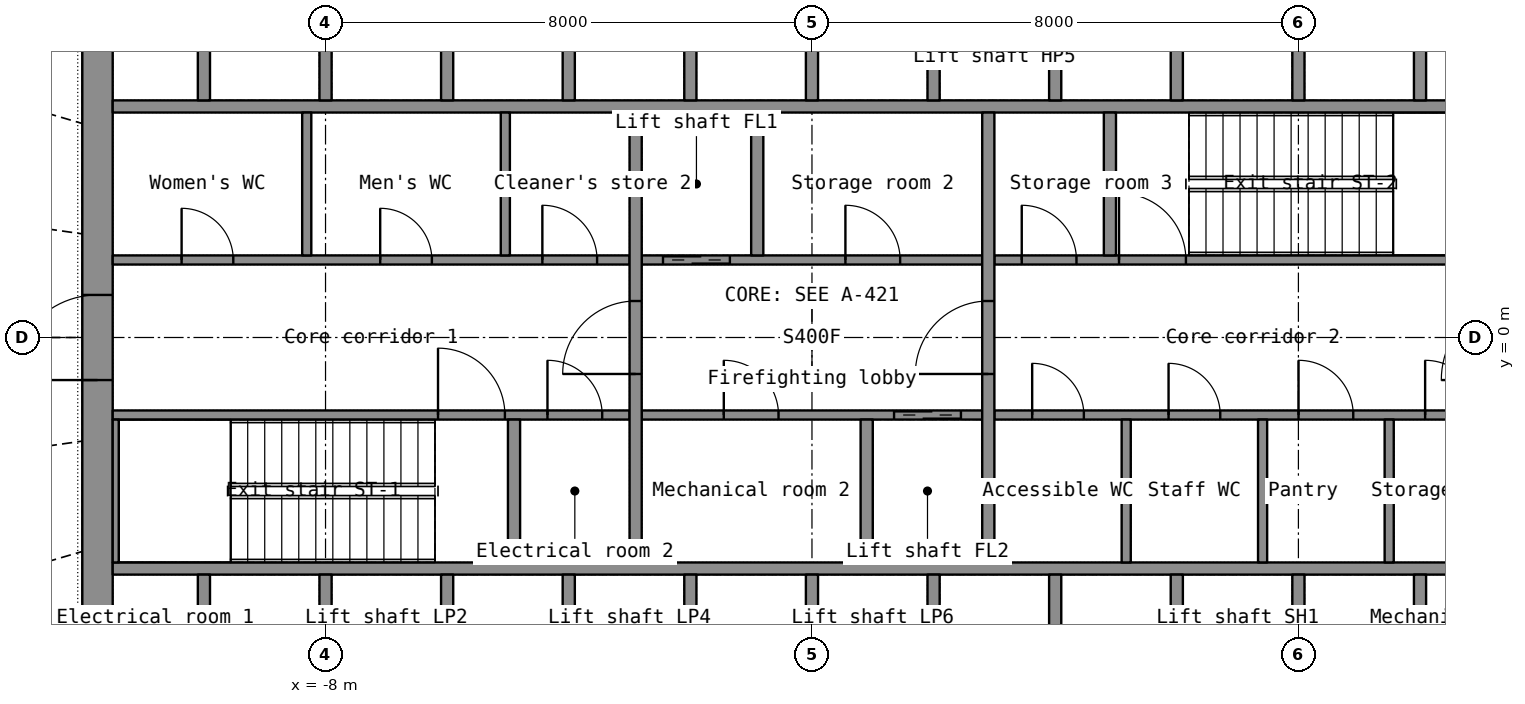
"""IFC4 building model, lengths in metres.
Left out: names, types, materials, properties, quantities, classifications, styles, units other than length and angle.
Written with IfcOpenShell. Run it as: python <this file> out.ifc"""

import sys

from ifc_helpers import new_model, si_unit, direction, frame, frame_2d, origin, place, context, subcontext, project, spatial, rectangle, extrude, element, fill, save


model = new_model("IFC4")
c1 = context("Model", 3, precision=1e-05, world=origin(), true_north=direction((0.0, 1.0)))
c2 = subcontext(c1, "Body", "Model", "MODEL_VIEW")
j1 = project(units=[si_unit("LENGTHUNIT", "METRE"), si_unit("PLANEANGLEUNIT", "RADIAN")], contexts=[c1])
p1 = place(None, origin())
s1 = spatial("IfcSite", under=j1, at=p1, CompositionType="ELEMENT")
p2 = place(p1, origin())
s2 = spatial("IfcBuilding", under=s1, at=p2, CompositionType="ELEMENT")
p3 = place(p2, frame((0.0, 0.0, 152.6)))
s3 = spatial("IfcBuildingStorey", under=s2, at=p3, CompositionType="ELEMENT", Elevation=152.6)
p4 = place(p3, frame((-11.75, -7.2, 0.0), z_axis=(0.0, 0.0, 1.0), x_axis=(0.0, 1.0, 0.0)))
e1 = element("IfcWall", 1, at=p4, inside=s3, PredefinedType="SHEAR", context=c2, shape_type="SweptSolid", body=[
    extrude(rectangle(XDim=14.4, YDim=0.5, at=frame_2d((7.2, 0.0))), origin(), (0.0, 0.0, 1.0), 4.1),
])
p5 = place(p4, frame((6.5, 0.0, 0.0)))
e2 = element("IfcOpeningElement", 2, at=p5, cuts=e1, PredefinedType="OPENING", context=c2, shape_type="SweptSolid", body=[
    extrude(rectangle(XDim=1.4, YDim=2.2, at=frame_2d((0.7, 1.1))), frame((0.0, 0.26, 0.0), z_axis=(0.0, -1.0, 0.0), x_axis=(1.0, 0.0, 0.0)), (0.0, 0.0, 1.0), 0.52),
])
for number, where, z_axis, x_axis in (
    (3, (-11.5, -3.8, 0.0), (0.0, 0.0, 1.0), (1.0, 0.0, 0.0)),
    (4, (-11.5, 3.8, 0.0), (0.0, 0.0, 1.0), (1.0, 0.0, 0.0)),
):
    element("IfcWall", number, at=place(p3, frame(where, z_axis=z_axis, x_axis=x_axis)), inside=s3, PredefinedType="SHEAR", context=c2, shape_type="SweptSolid", body=[
        extrude(rectangle(XDim=23.0, YDim=0.2, at=frame_2d((11.5, 0.0))), origin(), (0.0, 0.0, 1.0), 4.1),
    ])
for number, where, z_axis, x_axis in (
    (5, (-10.0, -6.7, 0.0), (0.0, 0.0, 1.0), (0.0, 1.0, 0.0)),
    (6, (-8.0, -6.7, 0.0), (0.0, 0.0, 1.0), (0.0, 1.0, 0.0)),
    (7, (-6.0, -6.7, 0.0), (0.0, 0.0, 1.0), (0.0, 1.0, 0.0)),
    (8, (-4.0, -6.7, 0.0), (0.0, 0.0, 1.0), (0.0, 1.0, 0.0)),
    (9, (-2.0, -6.7, 0.0), (0.0, 0.0, 1.0), (0.0, 1.0, 0.0)),
    (10, (0.0, -6.7, 0.0), (0.0, 0.0, 1.0), (0.0, 1.0, 0.0)),
    (11, (2.0, -6.7, 0.0), (0.0, 0.0, 1.0), (0.0, 1.0, 0.0)),
    (12, (4.0, -6.7, 0.0), (0.0, 0.0, 1.0), (0.0, 1.0, 0.0)),
    (13, (6.0, -6.7, 0.0), (0.0, 0.0, 1.0), (0.0, 1.0, 0.0)),
    (14, (8.0, -6.7, 0.0), (0.0, 0.0, 1.0), (0.0, 1.0, 0.0)),
    (15, (10.0, -6.7, 0.0), (0.0, 0.0, 1.0), (0.0, 1.0, 0.0)),
    (16, (-10.0, 3.9, 0.0), (0.0, 0.0, 1.0), (0.0, 1.0, 0.0)),
    (17, (-8.0, 3.9, 0.0), (0.0, 0.0, 1.0), (0.0, 1.0, 0.0)),
    (18, (-6.0, 3.9, 0.0), (0.0, 0.0, 1.0), (0.0, 1.0, 0.0)),
    (19, (-4.0, 3.9, 0.0), (0.0, 0.0, 1.0), (0.0, 1.0, 0.0)),
    (20, (-2.0, 3.9, 0.0), (0.0, 0.0, 1.0), (0.0, 1.0, 0.0)),
    (21, (0.0, 3.9, 0.0), (0.0, 0.0, 1.0), (0.0, 1.0, 0.0)),
    (22, (2.0, 3.9, 0.0), (0.0, 0.0, 1.0), (0.0, 1.0, 0.0)),
    (23, (4.0, 3.9, 0.0), (0.0, 0.0, 1.0), (0.0, 1.0, 0.0)),
    (24, (6.0, 3.9, 0.0), (0.0, 0.0, 1.0), (0.0, 1.0, 0.0)),
    (25, (8.0, 3.9, 0.0), (0.0, 0.0, 1.0), (0.0, 1.0, 0.0)),
    (26, (10.0, 3.9, 0.0), (0.0, 0.0, 1.0), (0.0, 1.0, 0.0)),
):
    element("IfcWall", number, at=place(p3, frame(where, z_axis=z_axis, x_axis=x_axis)), inside=s3, PredefinedType="SHEAR", context=c2, shape_type="SweptSolid", body=[
        extrude(rectangle(XDim=2.8, YDim=0.2, at=frame_2d((1.4, 0.0))), origin(), (0.0, 0.0, 1.0), 4.1),
    ])
p6 = place(p3, frame((-11.5, -1.275, 0.0), z_axis=(0.0, 0.0, 1.0), x_axis=(1.0, 0.0, 0.0)))
e27 = element("IfcWall", 27, at=p6, inside=s3, PredefinedType="SHEAR", context=c2, shape_type="SweptSolid", body=[
    extrude(rectangle(XDim=8.5, YDim=0.15, at=frame_2d((4.25, 0.0))), origin(), (0.0, 0.0, 1.0), 4.1),
])
p7 = place(p6, frame((5.35, 0.0, 0.0)))
e28 = element("IfcOpeningElement", 28, at=p7, cuts=e27, PredefinedType="OPENING", context=c2, shape_type="SweptSolid", body=[
    extrude(rectangle(XDim=1.1, YDim=2.15, at=frame_2d((0.55, 1.075))), frame((0.0, 0.085, 0.0), z_axis=(0.0, -1.0, 0.0), x_axis=(1.0, 0.0, 0.0)), (0.0, 0.0, 1.0), 0.17),
])
p8 = place(p6, frame((7.15, 0.0, 0.0)))
e29 = element("IfcOpeningElement", 29, at=p8, cuts=e27, PredefinedType="OPENING", context=c2, shape_type="SweptSolid", body=[
    extrude(rectangle(XDim=0.9, YDim=2.1, at=frame_2d((0.45, 1.05))), frame((0.0, 0.085, 0.0), z_axis=(0.0, -1.0, 0.0), x_axis=(1.0, 0.0, 0.0)), (0.0, 0.0, 1.0), 0.17),
])
p9 = place(p3, frame((-2.8, -1.275, 0.0), z_axis=(0.0, 0.0, 1.0), x_axis=(1.0, 0.0, 0.0)))
e30 = element("IfcWall", 30, at=p9, inside=s3, PredefinedType="SHEAR", context=c2, shape_type="SweptSolid", body=[
    extrude(rectangle(XDim=5.6, YDim=0.15, at=frame_2d((2.8, 0.0))), origin(), (0.0, 0.0, 1.0), 4.1),
])
p10 = place(p9, frame((4.15, 0.0, 0.0)))
e31 = element("IfcOpeningElement", 31, at=p10, cuts=e30, PredefinedType="OPENING", context=c2, shape_type="SweptSolid", body=[
    extrude(rectangle(XDim=1.1, YDim=2.2, at=frame_2d((0.55, 1.1))), frame((0.0, 0.085, 0.0), z_axis=(0.0, -1.0, 0.0), x_axis=(1.0, 0.0, 0.0)), (0.0, 0.0, 1.0), 0.17),
])
p11 = place(p9, frame((1.35, 0.0, 0.0)))
e32 = element("IfcOpeningElement", 32, at=p11, cuts=e30, PredefinedType="OPENING", context=c2, shape_type="SweptSolid", body=[
    extrude(rectangle(XDim=0.9, YDim=2.1, at=frame_2d((0.45, 1.05))), frame((0.0, 0.085, 0.0), z_axis=(0.0, -1.0, 0.0), x_axis=(1.0, 0.0, 0.0)), (0.0, 0.0, 1.0), 0.17),
])
p12 = place(p3, frame((3.0, -1.275, 0.0), z_axis=(0.0, 0.0, 1.0), x_axis=(1.0, 0.0, 0.0)))
e33 = element("IfcWall", 33, at=p12, inside=s3, PredefinedType="PARTITIONING", context=c2, shape_type="SweptSolid", body=[
    extrude(rectangle(XDim=8.5, YDim=0.15, at=frame_2d((4.25, 0.0))), origin(), (0.0, 0.0, 1.0), 4.1),
])
p13 = place(p12, frame((0.622, 0.0, 0.0)))
e34 = element("IfcOpeningElement", 34, at=p13, cuts=e33, PredefinedType="OPENING", context=c2, shape_type="SweptSolid", body=[
    extrude(rectangle(XDim=0.85, YDim=2.1, at=frame_2d((0.425, 1.05))), frame((0.0, 0.085, 0.0), z_axis=(0.0, -1.0, 0.0), x_axis=(1.0, 0.0, 0.0)), (0.0, 0.0, 1.0), 0.17),
])
p14 = place(p12, frame((2.865, 0.0, 0.0)))
e35 = element("IfcOpeningElement", 35, at=p14, cuts=e33, PredefinedType="OPENING", context=c2, shape_type="SweptSolid", body=[
    extrude(rectangle(XDim=0.85, YDim=2.1, at=frame_2d((0.425, 1.05))), frame((0.0, 0.085, 0.0), z_axis=(0.0, -1.0, 0.0), x_axis=(1.0, 0.0, 0.0)), (0.0, 0.0, 1.0), 0.17),
])
p15 = place(p12, frame((5.002, 0.0, 0.0)))
e36 = element("IfcOpeningElement", 36, at=p15, cuts=e33, PredefinedType="OPENING", context=c2, shape_type="SweptSolid", body=[
    extrude(rectangle(XDim=0.9, YDim=2.1, at=frame_2d((0.45, 1.05))), frame((0.0, 0.085, 0.0), z_axis=(0.0, -1.0, 0.0), x_axis=(1.0, 0.0, 0.0)), (0.0, 0.0, 1.0), 0.17),
])
p16 = place(p12, frame((7.084, 0.0, 0.0)))
e37 = element("IfcOpeningElement", 37, at=p16, cuts=e33, PredefinedType="OPENING", context=c2, shape_type="SweptSolid", body=[
    extrude(rectangle(XDim=0.9, YDim=2.1, at=frame_2d((0.45, 1.05))), frame((0.0, 0.085, 0.0), z_axis=(0.0, -1.0, 0.0), x_axis=(1.0, 0.0, 0.0)), (0.0, 0.0, 1.0), 0.17),
])
p17 = place(p3, frame((-11.5, 1.275, 0.0), z_axis=(0.0, 0.0, 1.0), x_axis=(1.0, 0.0, 0.0)))
e38 = element("IfcWall", 38, at=p17, inside=s3, PredefinedType="PARTITIONING", context=c2, shape_type="SweptSolid", body=[
    extrude(rectangle(XDim=8.5, YDim=0.15, at=frame_2d((4.25, 0.0))), origin(), (0.0, 0.0, 1.0), 4.1),
])
p18 = place(p17, frame((1.133, 0.0, 0.0)))
e39 = element("IfcOpeningElement", 39, at=p18, cuts=e38, PredefinedType="OPENING", context=c2, shape_type="SweptSolid", body=[
    extrude(rectangle(XDim=0.85, YDim=2.1, at=frame_2d((0.425, 1.05))), frame((0.0, 0.085, 0.0), z_axis=(0.0, -1.0, 0.0), x_axis=(1.0, 0.0, 0.0)), (0.0, 0.0, 1.0), 0.17),
])
p19 = place(p17, frame((4.399, 0.0, 0.0)))
e40 = element("IfcOpeningElement", 40, at=p19, cuts=e38, PredefinedType="OPENING", context=c2, shape_type="SweptSolid", body=[
    extrude(rectangle(XDim=0.85, YDim=2.1, at=frame_2d((0.425, 1.05))), frame((0.0, 0.085, 0.0), z_axis=(0.0, -1.0, 0.0), x_axis=(1.0, 0.0, 0.0)), (0.0, 0.0, 1.0), 0.17),
])
p20 = place(p17, frame((7.066, 0.0, 0.0)))
e41 = element("IfcOpeningElement", 41, at=p20, cuts=e38, PredefinedType="OPENING", context=c2, shape_type="SweptSolid", body=[
    extrude(rectangle(XDim=0.9, YDim=2.1, at=frame_2d((0.45, 1.05))), frame((0.0, 0.085, 0.0), z_axis=(0.0, -1.0, 0.0), x_axis=(1.0, 0.0, 0.0)), (0.0, 0.0, 1.0), 0.17),
])
p21 = place(p3, frame((-2.8, 1.275, 0.0), z_axis=(0.0, 0.0, 1.0), x_axis=(1.0, 0.0, 0.0)))
e42 = element("IfcWall", 42, at=p21, inside=s3, PredefinedType="SHEAR", context=c2, shape_type="SweptSolid", body=[
    extrude(rectangle(XDim=5.6, YDim=0.15, at=frame_2d((2.8, 0.0))), origin(), (0.0, 0.0, 1.0), 4.1),
])
p22 = place(p21, frame((0.35, 0.0, 0.0)))
e43 = element("IfcOpeningElement", 43, at=p22, cuts=e42, PredefinedType="OPENING", context=c2, shape_type="SweptSolid", body=[
    extrude(rectangle(XDim=1.1, YDim=2.2, at=frame_2d((0.55, 1.1))), frame((0.0, 0.085, 0.0), z_axis=(0.0, -1.0, 0.0), x_axis=(1.0, 0.0, 0.0)), (0.0, 0.0, 1.0), 0.17),
])
p23 = place(p21, frame((3.35, 0.0, 0.0)))
e44 = element("IfcOpeningElement", 44, at=p23, cuts=e42, PredefinedType="OPENING", context=c2, shape_type="SweptSolid", body=[
    extrude(rectangle(XDim=0.9, YDim=2.1, at=frame_2d((0.45, 1.05))), frame((0.0, 0.085, 0.0), z_axis=(0.0, -1.0, 0.0), x_axis=(1.0, 0.0, 0.0)), (0.0, 0.0, 1.0), 0.17),
])
p24 = place(p3, frame((3.0, 1.275, 0.0), z_axis=(0.0, 0.0, 1.0), x_axis=(1.0, 0.0, 0.0)))
e45 = element("IfcWall", 45, at=p24, inside=s3, PredefinedType="SHEAR", context=c2, shape_type="SweptSolid", body=[
    extrude(rectangle(XDim=8.5, YDim=0.15, at=frame_2d((4.25, 0.0))), origin(), (0.0, 0.0, 1.0), 4.1),
])
p25 = place(p24, frame((2.05, 0.0, 0.0)))
e46 = element("IfcOpeningElement", 46, at=p25, cuts=e45, PredefinedType="OPENING", context=c2, shape_type="SweptSolid", body=[
    extrude(rectangle(XDim=1.1, YDim=2.15, at=frame_2d((0.55, 1.075))), frame((0.0, 0.085, 0.0), z_axis=(0.0, -1.0, 0.0), x_axis=(1.0, 0.0, 0.0)), (0.0, 0.0, 1.0), 0.17),
])
p26 = place(p24, frame((0.45, 0.0, 0.0)))
e47 = element("IfcOpeningElement", 47, at=p26, cuts=e45, PredefinedType="OPENING", context=c2, shape_type="SweptSolid", body=[
    extrude(rectangle(XDim=0.9, YDim=2.1, at=frame_2d((0.45, 1.05))), frame((0.0, 0.085, 0.0), z_axis=(0.0, -1.0, 0.0), x_axis=(1.0, 0.0, 0.0)), (0.0, 0.0, 1.0), 0.17),
])
p27 = place(p3, frame((-2.9, -3.7, 0.0), z_axis=(0.0, 0.0, 1.0), x_axis=(0.0, 1.0, 0.0)))
e48 = element("IfcWall", 48, at=p27, inside=s3, PredefinedType="SHEAR", context=c2, shape_type="SweptSolid", body=[
    extrude(rectangle(XDim=7.4, YDim=0.2, at=frame_2d((3.7, 0.0))), origin(), (0.0, 0.0, 1.0), 4.1),
])
p28 = place(p27, frame((3.1, 0.0, 0.0)))
e49 = element("IfcOpeningElement", 49, at=p28, cuts=e48, PredefinedType="OPENING", context=c2, shape_type="SweptSolid", body=[
    extrude(rectangle(XDim=1.2, YDim=2.2, at=frame_2d((0.6, 1.1))), frame((0.0, 0.11, 0.0), z_axis=(0.0, -1.0, 0.0), x_axis=(1.0, 0.0, 0.0)), (0.0, 0.0, 1.0), 0.22),
])
p29 = place(p3, frame((2.9, -3.7, 0.0), z_axis=(0.0, 0.0, 1.0), x_axis=(0.0, 1.0, 0.0)))
e50 = element("IfcWall", 50, at=p29, inside=s3, PredefinedType="SHEAR", context=c2, shape_type="SweptSolid", body=[
    extrude(rectangle(XDim=7.4, YDim=0.2, at=frame_2d((3.7, 0.0))), origin(), (0.0, 0.0, 1.0), 4.1),
])
p30 = place(p29, frame((3.1, 0.0, 0.0)))
e51 = element("IfcOpeningElement", 51, at=p30, cuts=e50, PredefinedType="OPENING", context=c2, shape_type="SweptSolid", body=[
    extrude(rectangle(XDim=1.2, YDim=2.2, at=frame_2d((0.6, 1.1))), frame((0.0, 0.11, 0.0), z_axis=(0.0, -1.0, 0.0), x_axis=(1.0, 0.0, 0.0)), (0.0, 0.0, 1.0), 0.22),
])
for number, where, z_axis, x_axis in (
    (52, (-0.9, 1.35, 0.0), (0.0, 0.0, 1.0), (0.0, 1.0, 0.0)),
    (53, (0.9, -3.7, 0.0), (0.0, 0.0, 1.0), (0.0, 1.0, 0.0)),
):
    element("IfcWall", number, at=place(p3, frame(where, z_axis=z_axis, x_axis=x_axis)), inside=s3, PredefinedType="SHEAR", context=c2, shape_type="SweptSolid", body=[
        extrude(rectangle(XDim=2.35, YDim=0.2, at=frame_2d((1.175, 0.0))), origin(), (0.0, 0.0, 1.0), 4.1),
    ])
p31 = place(p3, frame((-11.45, -3.7, 0.0), z_axis=(0.0, 0.0, 1.0), x_axis=(0.0, 1.0, 0.0)))
e54 = element("IfcWall", 54, at=p31, inside=s3, PredefinedType="SHEAR", context=c2, shape_type="SweptSolid", body=[
    extrude(rectangle(XDim=2.35, YDim=0.1, at=frame_2d((1.175, 0.0))), origin(), (0.0, 0.0, 1.0), 4.1),
])
for number, where, z_axis, x_axis in (
    (55, (-4.9, -3.7, 0.0), (0.0, 0.0, 1.0), (0.0, 1.0, 0.0)),
    (56, (4.9, 1.35, 0.0), (0.0, 0.0, 1.0), (0.0, 1.0, 0.0)),
):
    element("IfcWall", number, at=place(p3, frame(where, z_axis=z_axis, x_axis=x_axis)), inside=s3, PredefinedType="SHEAR", context=c2, shape_type="SweptSolid", body=[
        extrude(rectangle(XDim=2.35, YDim=0.2, at=frame_2d((1.175, 0.0))), origin(), (0.0, 0.0, 1.0), 4.1),
    ])
for number, where, z_axis, x_axis in (
    (57, (-8.309, 1.35, 0.0), (0.0, 0.0, 1.0), (0.0, 1.0, 0.0)),
    (58, (-5.043, 1.35, 0.0), (0.0, 0.0, 1.0), (0.0, 1.0, 0.0)),
    (59, (5.168, -3.7, 0.0), (0.0, 0.0, 1.0), (0.0, 1.0, 0.0)),
    (60, (7.411, -3.7, 0.0), (0.0, 0.0, 1.0), (0.0, 1.0, 0.0)),
    (61, (9.493, -3.7, 0.0), (0.0, 0.0, 1.0), (0.0, 1.0, 0.0)),
):
    element("IfcWall", number, at=place(p3, frame(where, z_axis=z_axis, x_axis=x_axis)), inside=s3, PredefinedType="PARTITIONING", context=c2, shape_type="SweptSolid", body=[
        extrude(rectangle(XDim=2.35, YDim=0.15, at=frame_2d((1.175, 0.0))), origin(), (0.0, 0.0, 1.0), 4.1),
    ])
p32 = place(p5, origin())
e62 = element("IfcDoor", 62, at=p32, inside=s3, OperationType="DOUBLE_DOOR_SINGLE_SWING", PredefinedType="DOOR", context=c2, shape_type="SweptSolid", body=[
    extrude(rectangle(XDim=1.4, YDim=2.2, at=frame_2d((0.7, 1.1))), frame((0.0, 0.025, 0.0), z_axis=(0.0, -1.0, 0.0), x_axis=(1.0, 0.0, 0.0)), (0.0, 0.0, 1.0), 0.05),
])
fill(e2, e62)
p33 = place(p28, origin())
e63 = element("IfcDoor", 63, at=p33, inside=s3, OperationType="SINGLE_SWING_LEFT", PredefinedType="DOOR", context=c2, shape_type="SweptSolid", body=[
    extrude(rectangle(XDim=1.2, YDim=2.2, at=frame_2d((0.6, 1.1))), frame((0.0, 0.025, 0.0), z_axis=(0.0, -1.0, 0.0), x_axis=(1.0, 0.0, 0.0)), (0.0, 0.0, 1.0), 0.05),
])
fill(e49, e63)
p34 = place(p30, origin())
e64 = element("IfcDoor", 64, at=p34, inside=s3, OperationType="SINGLE_SWING_LEFT", PredefinedType="DOOR", context=c2, shape_type="SweptSolid", body=[
    extrude(rectangle(XDim=1.2, YDim=2.2, at=frame_2d((0.6, 1.1))), frame((0.0, 0.025, 0.0), z_axis=(0.0, -1.0, 0.0), x_axis=(1.0, 0.0, 0.0)), (0.0, 0.0, 1.0), 0.05),
])
fill(e51, e64)
p35 = place(p22, origin())
e65 = element("IfcDoor", 65, at=p35, inside=s3, OperationType="DOUBLE_DOOR_SLIDING", PredefinedType="DOOR", context=c2, shape_type="SweptSolid", body=[
    extrude(rectangle(XDim=1.1, YDim=2.2, at=frame_2d((0.55, 1.1))), frame((0.0, 0.025, 0.0), z_axis=(0.0, -1.0, 0.0), x_axis=(1.0, 0.0, 0.0)), (0.0, 0.0, 1.0), 0.05),
])
fill(e43, e65)
p36 = place(p10, origin())
e66 = element("IfcDoor", 66, at=p36, inside=s3, OperationType="DOUBLE_DOOR_SLIDING", PredefinedType="DOOR", context=c2, shape_type="SweptSolid", body=[
    extrude(rectangle(XDim=1.1, YDim=2.2, at=frame_2d((0.55, 1.1))), frame((0.0, 0.025, 0.0), z_axis=(0.0, -1.0, 0.0), x_axis=(1.0, 0.0, 0.0)), (0.0, 0.0, 1.0), 0.05),
])
fill(e31, e66)
p37 = place(p7, origin())
e67 = element("IfcDoor", 67, at=p37, inside=s3, OperationType="SINGLE_SWING_LEFT", PredefinedType="DOOR", context=c2, shape_type="SweptSolid", body=[
    extrude(rectangle(XDim=1.1, YDim=2.15, at=frame_2d((0.55, 1.075))), frame((0.0, 0.025, 0.0), z_axis=(0.0, -1.0, 0.0), x_axis=(1.0, 0.0, 0.0)), (0.0, 0.0, 1.0), 0.05),
])
fill(e28, e67)
p38 = place(p25, origin())
e68 = element("IfcDoor", 68, at=p38, inside=s3, OperationType="SINGLE_SWING_LEFT", PredefinedType="DOOR", context=c2, shape_type="SweptSolid", body=[
    extrude(rectangle(XDim=1.1, YDim=2.15, at=frame_2d((0.55, 1.075))), frame((0.0, 0.025, 0.0), z_axis=(0.0, -1.0, 0.0), x_axis=(1.0, 0.0, 0.0)), (0.0, 0.0, 1.0), 0.05),
])
fill(e46, e68)
p39 = place(p18, origin())
e69 = element("IfcDoor", 69, at=p39, inside=s3, OperationType="SINGLE_SWING_LEFT", PredefinedType="DOOR", context=c2, shape_type="SweptSolid", body=[
    extrude(rectangle(XDim=0.85, YDim=2.1, at=frame_2d((0.425, 1.05))), frame((0.0, 0.025, 0.0), z_axis=(0.0, -1.0, 0.0), x_axis=(1.0, 0.0, 0.0)), (0.0, 0.0, 1.0), 0.05),
])
fill(e39, e69)
p40 = place(p19, origin())
e70 = element("IfcDoor", 70, at=p40, inside=s3, OperationType="SINGLE_SWING_LEFT", PredefinedType="DOOR", context=c2, shape_type="SweptSolid", body=[
    extrude(rectangle(XDim=0.85, YDim=2.1, at=frame_2d((0.425, 1.05))), frame((0.0, 0.025, 0.0), z_axis=(0.0, -1.0, 0.0), x_axis=(1.0, 0.0, 0.0)), (0.0, 0.0, 1.0), 0.05),
])
fill(e40, e70)
p41 = place(p20, origin())
e71 = element("IfcDoor", 71, at=p41, inside=s3, OperationType="SINGLE_SWING_LEFT", PredefinedType="DOOR", context=c2, shape_type="SweptSolid", body=[
    extrude(rectangle(XDim=0.9, YDim=2.1, at=frame_2d((0.45, 1.05))), frame((0.0, 0.025, 0.0), z_axis=(0.0, -1.0, 0.0), x_axis=(1.0, 0.0, 0.0)), (0.0, 0.0, 1.0), 0.05),
])
fill(e41, e71)
p42 = place(p13, origin())
e72 = element("IfcDoor", 72, at=p42, inside=s3, OperationType="SINGLE_SWING_LEFT", PredefinedType="DOOR", context=c2, shape_type="SweptSolid", body=[
    extrude(rectangle(XDim=0.85, YDim=2.1, at=frame_2d((0.425, 1.05))), frame((0.0, 0.025, 0.0), z_axis=(0.0, -1.0, 0.0), x_axis=(1.0, 0.0, 0.0)), (0.0, 0.0, 1.0), 0.05),
])
fill(e34, e72)
p43 = place(p14, origin())
e73 = element("IfcDoor", 73, at=p43, inside=s3, OperationType="SINGLE_SWING_LEFT", PredefinedType="DOOR", context=c2, shape_type="SweptSolid", body=[
    extrude(rectangle(XDim=0.85, YDim=2.1, at=frame_2d((0.425, 1.05))), frame((0.0, 0.025, 0.0), z_axis=(0.0, -1.0, 0.0), x_axis=(1.0, 0.0, 0.0)), (0.0, 0.0, 1.0), 0.05),
])
fill(e35, e73)
p44 = place(p15, origin())
e74 = element("IfcDoor", 74, at=p44, inside=s3, OperationType="SINGLE_SWING_LEFT", PredefinedType="DOOR", context=c2, shape_type="SweptSolid", body=[
    extrude(rectangle(XDim=0.9, YDim=2.1, at=frame_2d((0.45, 1.05))), frame((0.0, 0.025, 0.0), z_axis=(0.0, -1.0, 0.0), x_axis=(1.0, 0.0, 0.0)), (0.0, 0.0, 1.0), 0.05),
])
fill(e36, e74)
p45 = place(p16, origin())
e75 = element("IfcDoor", 75, at=p45, inside=s3, OperationType="SINGLE_SWING_LEFT", PredefinedType="DOOR", context=c2, shape_type="SweptSolid", body=[
    extrude(rectangle(XDim=0.9, YDim=2.1, at=frame_2d((0.45, 1.05))), frame((0.0, 0.025, 0.0), z_axis=(0.0, -1.0, 0.0), x_axis=(1.0, 0.0, 0.0)), (0.0, 0.0, 1.0), 0.05),
])
fill(e37, e75)
p46 = place(p23, origin())
e76 = element("IfcDoor", 76, at=p46, inside=s3, OperationType="SINGLE_SWING_LEFT", PredefinedType="DOOR", context=c2, shape_type="SweptSolid", body=[
    extrude(rectangle(XDim=0.9, YDim=2.1, at=frame_2d((0.45, 1.05))), frame((0.0, 0.025, 0.0), z_axis=(0.0, -1.0, 0.0), x_axis=(1.0, 0.0, 0.0)), (0.0, 0.0, 1.0), 0.05),
])
fill(e44, e76)
p47 = place(p11, origin())
e77 = element("IfcDoor", 77, at=p47, inside=s3, OperationType="SINGLE_SWING_LEFT", PredefinedType="DOOR", context=c2, shape_type="SweptSolid", body=[
    extrude(rectangle(XDim=0.9, YDim=2.1, at=frame_2d((0.45, 1.05))), frame((0.0, 0.025, 0.0), z_axis=(0.0, -1.0, 0.0), x_axis=(1.0, 0.0, 0.0)), (0.0, 0.0, 1.0), 0.05),
])
fill(e32, e77)
p48 = place(p26, origin())
e78 = element("IfcDoor", 78, at=p48, inside=s3, OperationType="SINGLE_SWING_LEFT", PredefinedType="DOOR", context=c2, shape_type="SweptSolid", body=[
    extrude(rectangle(XDim=0.9, YDim=2.1, at=frame_2d((0.45, 1.05))), frame((0.0, 0.025, 0.0), z_axis=(0.0, -1.0, 0.0), x_axis=(1.0, 0.0, 0.0)), (0.0, 0.0, 1.0), 0.05),
])
fill(e47, e78)
p49 = place(p8, origin())
e79 = element("IfcDoor", 79, at=p49, inside=s3, OperationType="SINGLE_SWING_LEFT", PredefinedType="DOOR", context=c2, shape_type="SweptSolid", body=[
    extrude(rectangle(XDim=0.9, YDim=2.1, at=frame_2d((0.45, 1.05))), frame((0.0, 0.025, 0.0), z_axis=(0.0, -1.0, 0.0), x_axis=(1.0, 0.0, 0.0)), (0.0, 0.0, 1.0), 0.05),
])
fill(e29, e79)
save(model, sys.argv[1])
